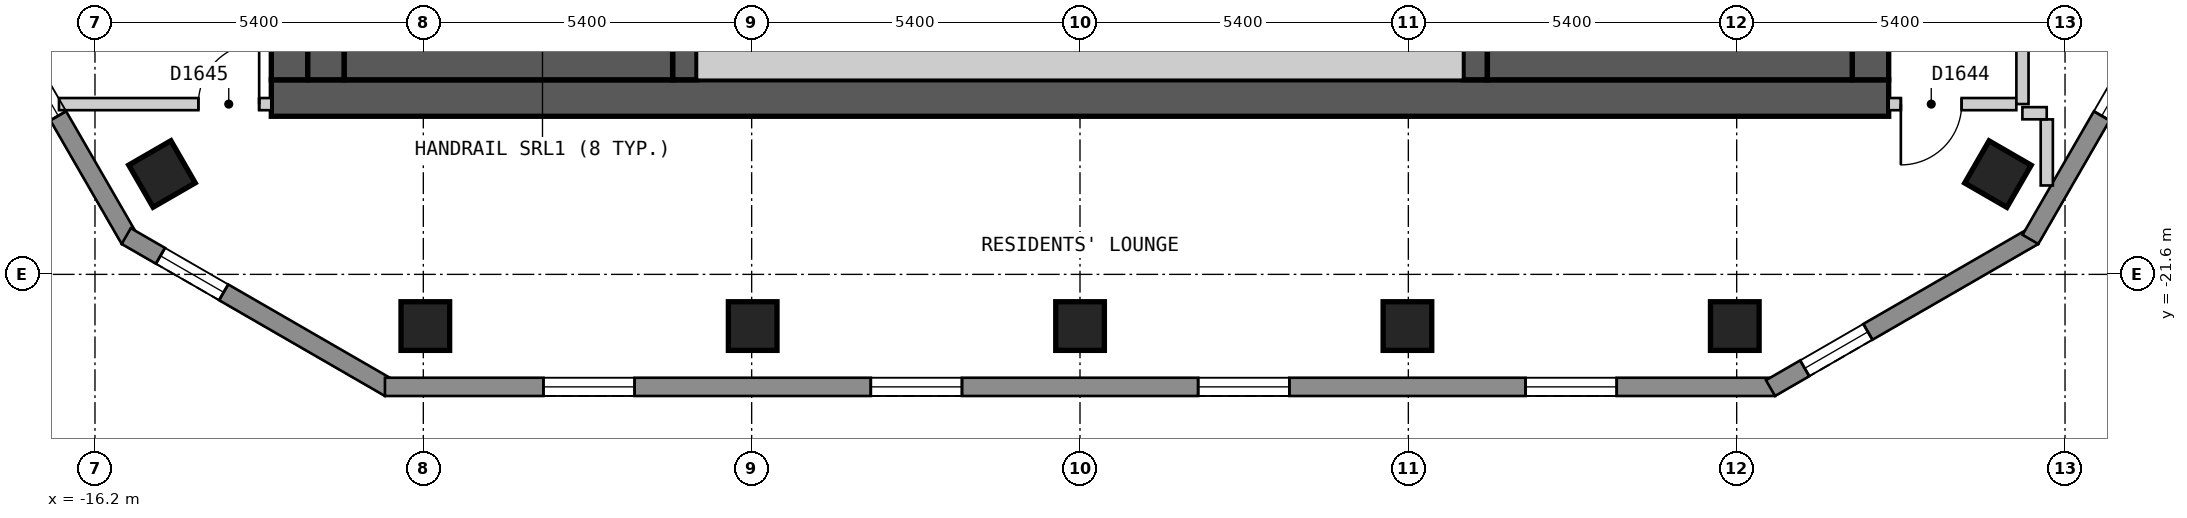
"""IFC4 building model, lengths in metres.
Left out: names, types, materials, properties, quantities, classifications, styles, units other than length and angle.
Written with IfcOpenShell. Run it as: python <this file> out.ifc"""

import sys

from ifc_helpers import new_model, si_unit, direction, frame, frame_2d, origin, origin_2d, place, context, subcontext, project, spatial, polyline, rectangle, outline, extrude, element, fill, save


model = new_model("IFC4")
c1 = context("Model", 3, precision=1e-05, world=origin(), true_north=direction((0.0, 1.0)))
c2 = subcontext(c1, "Body", "Model", "MODEL_VIEW")
j1 = project(units=[si_unit("LENGTHUNIT", "METRE"), si_unit("PLANEANGLEUNIT", "RADIAN")], contexts=[c1])
p1 = place(None, origin())
s1 = spatial("IfcSite", under=j1, at=p1, CompositionType="ELEMENT")
p2 = place(p1, origin())
s2 = spatial("IfcBuilding", under=s1, at=p2, CompositionType="ELEMENT")
p3 = place(p2, frame((0.0, 0.0, 163.2)))
s3 = spatial("IfcBuildingStorey", under=s2, at=p3, CompositionType="ELEMENT", Elevation=163.2)
for number, where, z_axis, x_axis in (
    (1, (-15.098, -19.949, 0.0), (0.0, 0.0, 1.0), (0.5, -0.866, 0.0)),
    (2, (-10.767, -22.45, 0.0), (0.0, 0.0, 1.0), (1.0, 0.0, 0.0)),
    (3, (-5.383, -22.45, 0.0), (0.0, 0.0, 1.0), (1.0, 0.0, 0.0)),
    (4, (0.001, -22.45, 0.0), (0.0, 0.0, 1.0), (1.0, 0.0, 0.0)),
    (5, (5.385, -22.45, 0.0), (0.0, 0.0, 1.0), (1.0, 0.0, 0.0)),
    (6, (10.769, -22.45, 0.0), (0.0, 0.0, 1.0), (1.0, 0.0, 0.0)),
    (7, (15.097, -19.951, 0.0), (0.0, 0.0, 1.0), (0.5, 0.866, 0.0)),
):
    element("IfcColumn", number, at=place(p3, frame(where, z_axis=z_axis, x_axis=x_axis)), inside=s3, PredefinedType="COLUMN", context=c2, shape_type="SweptSolid", body=[
        extrude(rectangle(XDim=0.8, YDim=0.8, at=origin_2d()), origin(), (0.0, 0.0, 1.0), 3.0),
    ])
p4 = place(p3, frame((-13.3, -18.7, 0.0), z_axis=(0.0, 0.0, 1.0), x_axis=(1.0, 0.0, 0.0)))
e8 = element("IfcWall", 8, at=p4, inside=s3, PredefinedType="SHEAR", context=c2, shape_type="SweptSolid", body=[
    extrude(rectangle(XDim=26.6, YDim=0.6, at=frame_2d((13.3, 0.0))), origin(), (0.0, 0.0, 1.0), 2.7),
])
p5 = place(p3, frame((-13.0, -18.4, 0.0), z_axis=(0.0, 0.0, 1.0), x_axis=(0.0, 1.0, 0.0)))
e9 = element("IfcWall", 9, at=p5, inside=s3, PredefinedType="SHEAR", context=c2, shape_type="SweptSolid", body=[
    extrude(rectangle(XDim=12.8, YDim=0.6, at=frame_2d((6.4, 0.0))), origin(), (0.0, 0.0, 1.0), 2.7),
])
p6 = place(p5, frame((4.2, 0.0, 0.0)))
e10 = element("IfcOpeningElement", 10, at=p6, cuts=e9, PredefinedType="OPENING", context=c2, shape_type="SweptSolid", body=[
    extrude(rectangle(XDim=1.2, YDim=2.1, at=frame_2d((0.6, 1.05))), frame((0.0, 0.31, 0.0), z_axis=(0.0, -1.0, 0.0), x_axis=(1.0, 0.0, 0.0)), (0.0, 0.0, 1.0), 0.62),
])
p7 = place(p3, frame((13.0, -18.4, 0.0), z_axis=(0.0, 0.0, 1.0), x_axis=(0.0, 1.0, 0.0)))
e11 = element("IfcWall", 11, at=p7, inside=s3, PredefinedType="SHEAR", context=c2, shape_type="SweptSolid", body=[
    extrude(rectangle(XDim=12.8, YDim=0.6, at=frame_2d((6.4, 0.0))), origin(), (0.0, 0.0, 1.0), 2.7),
])
for number, where, z_axis, x_axis in (
    (12, (-6.5, -18.4, 0.0), (0.0, 0.0, 1.0), (0.0, 1.0, 0.0)),
    (13, (6.5, -18.4, 0.0), (0.0, 0.0, 1.0), (0.0, 1.0, 0.0)),
):
    element("IfcWall", number, at=place(p3, frame(where, z_axis=z_axis, x_axis=x_axis)), inside=s3, PredefinedType="SHEAR", context=c2, shape_type="SweptSolid", body=[
        extrude(rectangle(XDim=3.55, YDim=0.4, at=frame_2d((1.775, 0.0))), origin(), (0.0, 0.0, 1.0), 2.7),
    ])
p8 = place(p3, frame((-26.024, -3.025, 0.0), z_axis=(0.0, 0.0, 1.0), x_axis=(0.500018670445, -0.86601462413, 0.0)))
e14 = element("IfcWall", 14, at=p8, inside=s3, PredefinedType="SOLIDWALL", context=c2, shape_type="SweptSolid", body=[
    extrude(outline(polyline([(0.0, -0.15), (20.785, -0.15), (20.705, 0.15), (0.08, 0.15), (0.0, -0.15)])), origin(), (0.0, 0.0, 1.0), 2.7),
])
p9 = place(p8, frame((2.346, 0.0, 0.15)))
e15 = element("IfcOpeningElement", 15, at=p9, cuts=e14, PredefinedType="OPENING", context=c2, shape_type="SweptSolid", body=[
    extrude(rectangle(XDim=1.5, YDim=2.1, at=frame_2d((0.75, 1.05))), frame((0.0, 0.16, 0.0), z_axis=(0.0, -1.0, 0.0), x_axis=(1.0, 0.0, 0.0)), (0.0, 0.0, 1.0), 0.32),
])
p10 = place(p8, frame((7.21, 0.0, 0.15)))
e16 = element("IfcOpeningElement", 16, at=p10, cuts=e14, PredefinedType="OPENING", context=c2, shape_type="SweptSolid", body=[
    extrude(rectangle(XDim=1.5, YDim=2.1, at=frame_2d((0.75, 1.05))), frame((0.0, 0.16, 0.0), z_axis=(0.0, -1.0, 0.0), x_axis=(1.0, 0.0, 0.0)), (0.0, 0.0, 1.0), 0.32),
])
p11 = place(p8, frame((12.073, 0.0, 0.15)))
e17 = element("IfcOpeningElement", 17, at=p11, cuts=e14, PredefinedType="OPENING", context=c2, shape_type="SweptSolid", body=[
    extrude(rectangle(XDim=1.5, YDim=2.1, at=frame_2d((0.75, 1.05))), frame((0.0, 0.16, 0.0), z_axis=(0.0, -1.0, 0.0), x_axis=(1.0, 0.0, 0.0)), (0.0, 0.0, 1.0), 0.32),
])
p12 = place(p8, frame((16.938, 0.0, 0.15)))
e18 = element("IfcOpeningElement", 18, at=p12, cuts=e14, PredefinedType="OPENING", context=c2, shape_type="SweptSolid", body=[
    extrude(rectangle(XDim=1.5, YDim=2.1, at=frame_2d((0.75, 1.05))), frame((0.0, 0.16, 0.0), z_axis=(0.0, -1.0, 0.0), x_axis=(1.0, 0.0, 0.0)), (0.0, 0.0, 1.0), 0.32),
])
p13 = place(p3, frame((-15.686, -20.97, 0.0), z_axis=(0.0, 0.0, 1.0), x_axis=(0.866022959057, -0.500004234368, 0.0)))
e19 = element("IfcWall", 19, at=p13, inside=s3, PredefinedType="SOLIDWALL", context=c2, shape_type="SweptSolid", body=[
    extrude(outline(polyline([(0.0, -0.15), (5.0, -0.15), (4.92, 0.15), (0.08, 0.15), (0.0, -0.15)])), origin(), (0.0, 0.0, 1.0), 2.7),
])
p14 = place(p13, frame((0.65, 0.0, 0.15)))
e20 = element("IfcOpeningElement", 20, at=p14, cuts=e19, PredefinedType="OPENING", context=c2, shape_type="SweptSolid", body=[
    extrude(rectangle(XDim=1.2, YDim=2.1, at=frame_2d((0.6, 1.05))), frame((0.0, 0.16, 0.0), z_axis=(0.0, -1.0, 0.0), x_axis=(1.0, 0.0, 0.0)), (0.0, 0.0, 1.0), 0.32),
])
p15 = place(p3, frame((-11.431, -23.45, 0.0), z_axis=(0.0, 0.0, 1.0), x_axis=(1.0, 0.0, 0.0)))
e21 = element("IfcWall", 21, at=p15, inside=s3, PredefinedType="SOLIDWALL", context=c2, shape_type="SweptSolid", body=[
    extrude(outline(polyline([(0.0, -0.15), (22.862, -0.15), (22.781, 0.15), (0.08, 0.15), (0.0, -0.15)])), origin(), (0.0, 0.0, 1.0), 2.7),
])
p16 = place(p15, frame((2.606, 0.0, 0.15)))
e22 = element("IfcOpeningElement", 22, at=p16, cuts=e21, PredefinedType="OPENING", context=c2, shape_type="SweptSolid", body=[
    extrude(rectangle(XDim=1.5, YDim=2.1, at=frame_2d((0.75, 1.05))), frame((0.0, 0.16, 0.0), z_axis=(0.0, -1.0, 0.0), x_axis=(1.0, 0.0, 0.0)), (0.0, 0.0, 1.0), 0.32),
])
p17 = place(p15, frame((7.99, 0.0, 0.15)))
e23 = element("IfcOpeningElement", 23, at=p17, cuts=e21, PredefinedType="OPENING", context=c2, shape_type="SweptSolid", body=[
    extrude(rectangle(XDim=1.5, YDim=2.1, at=frame_2d((0.75, 1.05))), frame((0.0, 0.16, 0.0), z_axis=(0.0, -1.0, 0.0), x_axis=(1.0, 0.0, 0.0)), (0.0, 0.0, 1.0), 0.32),
])
p18 = place(p15, frame((13.374, 0.0, 0.15)))
e24 = element("IfcOpeningElement", 24, at=p18, cuts=e21, PredefinedType="OPENING", context=c2, shape_type="SweptSolid", body=[
    extrude(rectangle(XDim=1.5, YDim=2.1, at=frame_2d((0.75, 1.05))), frame((0.0, 0.16, 0.0), z_axis=(0.0, -1.0, 0.0), x_axis=(1.0, 0.0, 0.0)), (0.0, 0.0, 1.0), 0.32),
])
p19 = place(p15, frame((18.758, 0.0, 0.15)))
e25 = element("IfcOpeningElement", 25, at=p19, cuts=e21, PredefinedType="OPENING", context=c2, shape_type="SweptSolid", body=[
    extrude(rectangle(XDim=1.5, YDim=2.1, at=frame_2d((0.75, 1.05))), frame((0.0, 0.16, 0.0), z_axis=(0.0, -1.0, 0.0), x_axis=(1.0, 0.0, 0.0)), (0.0, 0.0, 1.0), 0.32),
])
p20 = place(p3, frame((11.356, -23.47, 0.0), z_axis=(0.0, 0.0, 1.0), x_axis=(0.866022959057, 0.500004234368, 0.0)))
e26 = element("IfcWall", 26, at=p20, inside=s3, PredefinedType="SOLIDWALL", context=c2, shape_type="SweptSolid", body=[
    extrude(outline(polyline([(0.0, -0.15), (5.0, -0.15), (4.92, 0.15), (0.08, 0.15), (0.0, -0.15)])), origin(), (0.0, 0.0, 1.0), 2.7),
])
p21 = place(p20, frame((0.65, 0.0, 0.15)))
e27 = element("IfcOpeningElement", 27, at=p21, cuts=e26, PredefinedType="OPENING", context=c2, shape_type="SweptSolid", body=[
    extrude(rectangle(XDim=1.2, YDim=2.1, at=frame_2d((0.6, 1.05))), frame((0.0, 0.16, 0.0), z_axis=(0.0, -1.0, 0.0), x_axis=(1.0, 0.0, 0.0)), (0.0, 0.0, 1.0), 0.32),
])
p22 = place(p3, frame((15.631, -21.025, 0.0), z_axis=(0.0, 0.0, 1.0), x_axis=(0.500018670445, 0.86601462413, 0.0)))
e28 = element("IfcWall", 28, at=p22, inside=s3, PredefinedType="SOLIDWALL", context=c2, shape_type="SweptSolid", body=[
    extrude(outline(polyline([(0.0, -0.15), (20.785, -0.15), (20.705, 0.15), (0.08, 0.15), (0.0, -0.15)])), origin(), (0.0, 0.0, 1.0), 2.7),
])
p23 = place(p22, frame((2.346, 0.0, 0.15)))
e29 = element("IfcOpeningElement", 29, at=p23, cuts=e28, PredefinedType="OPENING", context=c2, shape_type="SweptSolid", body=[
    extrude(rectangle(XDim=1.5, YDim=2.1, at=frame_2d((0.75, 1.05))), frame((0.0, 0.16, 0.0), z_axis=(0.0, -1.0, 0.0), x_axis=(1.0, 0.0, 0.0)), (0.0, 0.0, 1.0), 0.32),
])
p24 = place(p22, frame((7.21, 0.0, 0.15)))
e30 = element("IfcOpeningElement", 30, at=p24, cuts=e28, PredefinedType="OPENING", context=c2, shape_type="SweptSolid", body=[
    extrude(rectangle(XDim=1.5, YDim=2.1, at=frame_2d((0.75, 1.05))), frame((0.0, 0.16, 0.0), z_axis=(0.0, -1.0, 0.0), x_axis=(1.0, 0.0, 0.0)), (0.0, 0.0, 1.0), 0.32),
])
p25 = place(p22, frame((12.073, 0.0, 0.15)))
e31 = element("IfcOpeningElement", 31, at=p25, cuts=e28, PredefinedType="OPENING", context=c2, shape_type="SweptSolid", body=[
    extrude(rectangle(XDim=1.5, YDim=2.1, at=frame_2d((0.75, 1.05))), frame((0.0, 0.16, 0.0), z_axis=(0.0, -1.0, 0.0), x_axis=(1.0, 0.0, 0.0)), (0.0, 0.0, 1.0), 0.32),
])
p26 = place(p22, frame((16.938, 0.0, 0.15)))
e32 = element("IfcOpeningElement", 32, at=p26, cuts=e28, PredefinedType="OPENING", context=c2, shape_type="SweptSolid", body=[
    extrude(rectangle(XDim=1.5, YDim=2.1, at=frame_2d((0.75, 1.05))), frame((0.0, 0.16, 0.0), z_axis=(0.0, -1.0, 0.0), x_axis=(1.0, 0.0, 0.0)), (0.0, 0.0, 1.0), 0.32),
])
p27 = place(p3, frame((13.3, -18.8, 0.0), z_axis=(0.0, 0.0, 1.0), x_axis=(1.0, 0.0, 0.0)))
e33 = element("IfcWall", 33, at=p27, inside=s3, PredefinedType="PARTITIONING", context=c2, shape_type="SweptSolid", body=[
    extrude(rectangle(XDim=2.099, YDim=0.2, at=frame_2d((1.049, 0.0))), origin(), (0.0, 0.0, 1.0), 2.7),
])
p28 = place(p27, frame((0.2, 0.0, 0.0)))
e34 = element("IfcOpeningElement", 34, at=p28, cuts=e33, PredefinedType="OPENING", context=c2, shape_type="SweptSolid", body=[
    extrude(rectangle(XDim=1.0, YDim=2.1, at=frame_2d((0.5, 1.05))), frame((0.0, 0.11, 0.0), z_axis=(0.0, -1.0, 0.0), x_axis=(1.0, 0.0, 0.0)), (0.0, 0.0, 1.0), 0.22),
])
p29 = place(p3, frame((15.5, -18.799, 0.0), z_axis=(0.0, 0.0, 1.0), x_axis=(0.0, 1.0, 0.0)))
e35 = element("IfcWall", 35, at=p29, inside=s3, PredefinedType="PARTITIONING", context=c2, shape_type="SweptSolid", body=[
    extrude(rectangle(XDim=15.349, YDim=0.2, at=frame_2d((7.675, 0.0))), origin(), (0.0, 0.0, 1.0), 2.7),
])
p30 = place(p29, frame((4.477, 0.0, 0.0)))
e36 = element("IfcOpeningElement", 36, at=p30, cuts=e35, PredefinedType="OPENING", context=c2, shape_type="SweptSolid", body=[
    extrude(rectangle(XDim=0.8, YDim=2.1, at=frame_2d((0.4, 1.05))), frame((0.0, 0.11, 0.0), z_axis=(0.0, -1.0, 0.0), x_axis=(1.0, 0.0, 0.0)), (0.0, 0.0, 1.0), 0.22),
])
p31 = place(p29, frame((11.348, 0.0, 0.0)))
e37 = element("IfcOpeningElement", 37, at=p31, cuts=e35, PredefinedType="OPENING", context=c2, shape_type="SweptSolid", body=[
    extrude(rectangle(XDim=1.0, YDim=2.1, at=frame_2d((0.5, 1.05))), frame((0.0, 0.11, 0.0), z_axis=(0.0, -1.0, 0.0), x_axis=(1.0, 0.0, 0.0)), (0.0, 0.0, 1.0), 0.22),
])
p32 = place(p3, frame((15.9, -19.051, 0.0), z_axis=(0.0, 0.0, 1.0), x_axis=(0.0, -1.0, 0.0)))
e38 = element("IfcWall", 38, at=p32, inside=s3, PredefinedType="PARTITIONING", context=c2, shape_type="SweptSolid", body=[
    extrude(rectangle(XDim=1.087, YDim=0.2, at=frame_2d((0.543, 0.0))), origin(), (0.0, 0.0, 1.0), 2.7),
])
p33 = place(p3, frame((15.499, -18.95, 0.0), z_axis=(0.0, 0.0, 1.0), x_axis=(1.0, 0.0, 0.0)))
e39 = element("IfcWall", 39, at=p33, inside=s3, PredefinedType="PARTITIONING", context=c2, shape_type="SweptSolid", body=[
    extrude(rectangle(XDim=0.4, YDim=0.2, at=frame_2d((0.2, 0.0))), origin(), (0.0, 0.0, 1.0), 2.7),
])
p34 = place(p3, frame((-16.792, -18.8, 0.0), z_axis=(0.0, 0.0, 1.0), x_axis=(1.0, 0.0, 0.0)))
e40 = element("IfcWall", 40, at=p34, inside=s3, PredefinedType="PARTITIONING", context=c2, shape_type="SweptSolid", body=[
    extrude(rectangle(XDim=3.492, YDim=0.2, at=frame_2d((1.746, 0.0))), origin(), (0.0, 0.0, 1.0), 2.7),
])
p35 = place(p34, frame((2.292, 0.0, 0.0)))
e41 = element("IfcOpeningElement", 41, at=p35, cuts=e40, PredefinedType="OPENING", context=c2, shape_type="SweptSolid", body=[
    extrude(rectangle(XDim=1.0, YDim=2.1, at=frame_2d((0.5, 1.05))), frame((0.0, 0.11, 0.0), z_axis=(0.0, -1.0, 0.0), x_axis=(1.0, 0.0, 0.0)), (0.0, 0.0, 1.0), 0.22),
])
p36 = place(p3, frame((-12.4, -18.4, 0.0), z_axis=(0.0, 0.0, 1.0), x_axis=(0.0, 1.0, 0.0)))
e42 = element("IfcWall", 42, at=p36, inside=s3, PredefinedType="SOLIDWALL", context=c2, shape_type="SweptSolid", body=[
    extrude(rectangle(XDim=3.55, YDim=0.6, at=frame_2d((1.775, 0.0))), origin(), (0.0, 0.0, 1.0), 2.7),
])
p37 = place(p3, frame((-12.1, -18.1, 0.0), z_axis=(0.0, 0.0, 1.0), x_axis=(1.0, 0.0, 0.0)))
e43 = element("IfcWall", 43, at=p37, inside=s3, PredefinedType="SOLIDWALL", context=c2, shape_type="SweptSolid", body=[
    extrude(rectangle(XDim=5.4, YDim=0.6, at=frame_2d((2.7, 0.0))), origin(), (0.0, 0.0, 1.0), 2.7),
])
p38 = place(p3, frame((-6.3, -18.1, 0.0), z_axis=(0.0, 0.0, 1.0), x_axis=(1.0, 0.0, 0.0)))
e44 = element("IfcWall", 44, at=p38, inside=s3, PredefinedType="PARTITIONING", context=c2, shape_type="SweptSolid", body=[
    extrude(rectangle(XDim=12.6, YDim=0.6, at=frame_2d((6.3, 0.0))), origin(), (0.0, 0.0, 1.0), 2.7),
])
p39 = place(p3, frame((6.7, -18.0, 0.0), z_axis=(0.0, 0.0, 1.0), x_axis=(1.0, 0.0, 0.0)))
e45 = element("IfcWall", 45, at=p39, inside=s3, PredefinedType="SOLIDWALL", context=c2, shape_type="SweptSolid", body=[
    extrude(rectangle(XDim=6.0, YDim=0.8, at=frame_2d((3.0, 0.0))), origin(), (0.0, 0.0, 1.0), 2.7),
])
p40 = place(p12, origin())
e46 = element("IfcWindow", 46, at=p40, inside=s3, PartitioningType="SINGLE_PANEL", PredefinedType="WINDOW", context=c2, shape_type="SweptSolid", body=[
    extrude(rectangle(XDim=1.5, YDim=2.1, at=frame_2d((0.75, 1.05))), frame((0.0, 0.03, 0.0), z_axis=(0.0, -1.0, 0.0), x_axis=(1.0, 0.0, 0.0)), (0.0, 0.0, 1.0), 0.06),
])
fill(e18, e46)
p41 = place(p14, origin())
e47 = element("IfcWindow", 47, at=p41, inside=s3, PartitioningType="SINGLE_PANEL", PredefinedType="WINDOW", context=c2, shape_type="SweptSolid", body=[
    extrude(rectangle(XDim=1.2, YDim=2.1, at=frame_2d((0.6, 1.05))), frame((0.0, 0.03, 0.0), z_axis=(0.0, -1.0, 0.0), x_axis=(1.0, 0.0, 0.0)), (0.0, 0.0, 1.0), 0.06),
])
fill(e20, e47)
p42 = place(p16, origin())
e48 = element("IfcWindow", 48, at=p42, inside=s3, PartitioningType="SINGLE_PANEL", PredefinedType="WINDOW", context=c2, shape_type="SweptSolid", body=[
    extrude(rectangle(XDim=1.5, YDim=2.1, at=frame_2d((0.75, 1.05))), frame((0.0, 0.03, 0.0), z_axis=(0.0, -1.0, 0.0), x_axis=(1.0, 0.0, 0.0)), (0.0, 0.0, 1.0), 0.06),
])
fill(e22, e48)
p43 = place(p17, origin())
e49 = element("IfcWindow", 49, at=p43, inside=s3, PartitioningType="SINGLE_PANEL", PredefinedType="WINDOW", context=c2, shape_type="SweptSolid", body=[
    extrude(rectangle(XDim=1.5, YDim=2.1, at=frame_2d((0.75, 1.05))), frame((0.0, 0.03, 0.0), z_axis=(0.0, -1.0, 0.0), x_axis=(1.0, 0.0, 0.0)), (0.0, 0.0, 1.0), 0.06),
])
fill(e23, e49)
p44 = place(p18, origin())
e50 = element("IfcWindow", 50, at=p44, inside=s3, PartitioningType="SINGLE_PANEL", PredefinedType="WINDOW", context=c2, shape_type="SweptSolid", body=[
    extrude(rectangle(XDim=1.5, YDim=2.1, at=frame_2d((0.75, 1.05))), frame((0.0, 0.03, 0.0), z_axis=(0.0, -1.0, 0.0), x_axis=(1.0, 0.0, 0.0)), (0.0, 0.0, 1.0), 0.06),
])
fill(e24, e50)
p45 = place(p19, origin())
e51 = element("IfcWindow", 51, at=p45, inside=s3, PartitioningType="SINGLE_PANEL", PredefinedType="WINDOW", context=c2, shape_type="SweptSolid", body=[
    extrude(rectangle(XDim=1.5, YDim=2.1, at=frame_2d((0.75, 1.05))), frame((0.0, 0.03, 0.0), z_axis=(0.0, -1.0, 0.0), x_axis=(1.0, 0.0, 0.0)), (0.0, 0.0, 1.0), 0.06),
])
fill(e25, e51)
p46 = place(p21, origin())
e52 = element("IfcWindow", 52, at=p46, inside=s3, PartitioningType="SINGLE_PANEL", PredefinedType="WINDOW", context=c2, shape_type="SweptSolid", body=[
    extrude(rectangle(XDim=1.2, YDim=2.1, at=frame_2d((0.6, 1.05))), frame((0.0, 0.03, 0.0), z_axis=(0.0, -1.0, 0.0), x_axis=(1.0, 0.0, 0.0)), (0.0, 0.0, 1.0), 0.06),
])
fill(e27, e52)
p47 = place(p23, origin())
e53 = element("IfcWindow", 53, at=p47, inside=s3, PartitioningType="SINGLE_PANEL", PredefinedType="WINDOW", context=c2, shape_type="SweptSolid", body=[
    extrude(rectangle(XDim=1.5, YDim=2.1, at=frame_2d((0.75, 1.05))), frame((0.0, 0.03, 0.0), z_axis=(0.0, -1.0, 0.0), x_axis=(1.0, 0.0, 0.0)), (0.0, 0.0, 1.0), 0.06),
])
fill(e29, e53)
p48 = place(p28, origin())
e54 = element("IfcDoor", 54, at=p48, inside=s3, OperationType="SINGLE_SWING_LEFT", PredefinedType="DOOR", context=c2, shape_type="SweptSolid", body=[
    extrude(rectangle(XDim=1.0, YDim=2.1, at=frame_2d((0.5, 1.05))), frame((0.0, 0.025, 0.0), z_axis=(0.0, -1.0, 0.0), x_axis=(1.0, 0.0, 0.0)), (0.0, 0.0, 1.0), 0.05),
])
fill(e34, e54)
p49 = place(p35, origin())
e55 = element("IfcDoor", 55, at=p49, inside=s3, OperationType="SINGLE_SWING_RIGHT", PredefinedType="DOOR", context=c2, shape_type="SweptSolid", body=[
    extrude(rectangle(XDim=1.0, YDim=2.1, at=frame_2d((0.5, 1.05))), frame((0.0, 0.025, 0.0), z_axis=(0.0, -1.0, 0.0), x_axis=(1.0, 0.0, 0.0)), (0.0, 0.0, 1.0), 0.05),
])
fill(e41, e55)
save(model, sys.argv[1])
